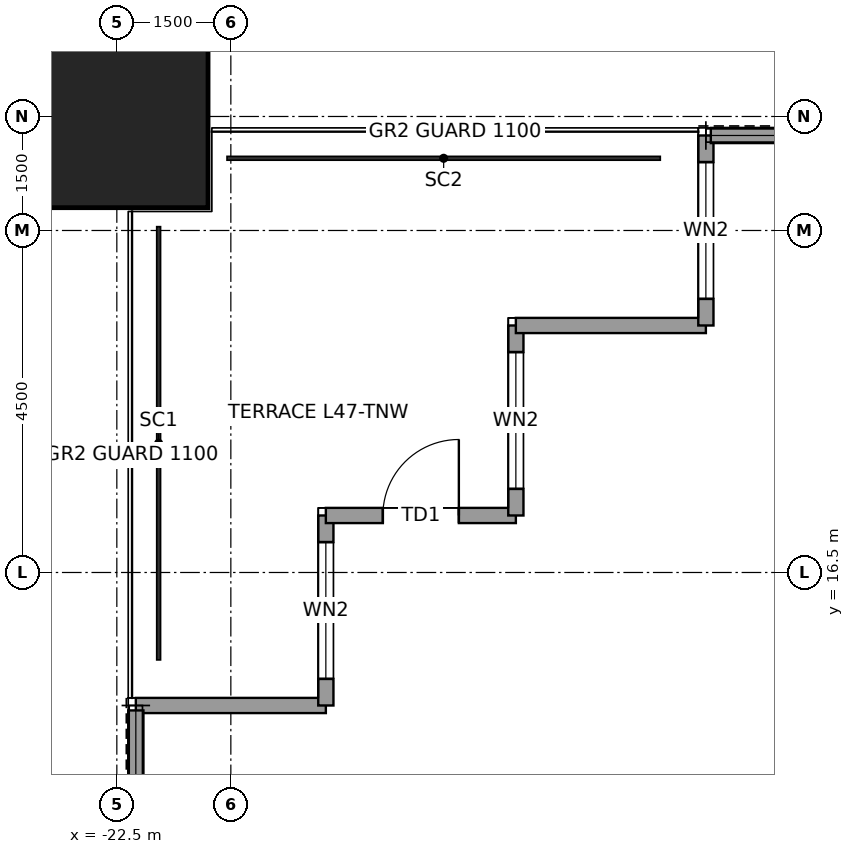
"""IFC4 building model, lengths in metres.
Left out: names, types, materials, properties, quantities, classifications, styles, units other than length and angle.
Written with IfcOpenShell. Run it as: python <this file> out.ifc"""

import sys

from ifc_helpers import new_model, si_unit, direction, frame, frame_2d, origin, origin_2d, place, context, subcontext, project, spatial, rectangle, hollow_rectangle, extrude, element, fill, save


model = new_model("IFC4")
c1 = context("Model", 3, precision=1e-05, world=origin(), true_north=direction((0.0, 1.0)))
c2 = subcontext(c1, "Body", "Model", "MODEL_VIEW")
j1 = project(units=[si_unit("LENGTHUNIT", "METRE"), si_unit("PLANEANGLEUNIT", "RADIAN")], contexts=[c1])
p1 = place(None, origin())
s1 = spatial("IfcSite", under=j1, at=p1, CompositionType="ELEMENT")
p2 = place(p1, origin())
s2 = spatial("IfcBuilding", under=s1, at=p2, CompositionType="ELEMENT")
p3 = place(p2, frame((0.0, 0.0, 221.9)))
s3 = spatial("IfcBuildingStorey", under=s2, at=p3, CompositionType="ELEMENT", Elevation=221.9)
p4 = place(p3, frame((-22.5, 22.5, 0.0), z_axis=(0.0, 0.0, 1.0), x_axis=(1.0, 0.0, 0.0)))
e1 = element("IfcColumn", 1, at=p4, inside=s3, PredefinedType="COLUMN", context=c2, shape_type="SweptSolid", body=[
    extrude(hollow_rectangle(XDim=2.4, YDim=2.4, WallThickness=0.12, at=origin_2d()), origin(), (0.0, 0.0, 1.0), 4.0),
])
p5 = place(p3, frame((-22.25, 14.75, 0.0), z_axis=(0.0, 0.0, 1.0), x_axis=(1.0, 0.0, 0.0)))
e2 = element("IfcWall", 2, at=p5, inside=s3, PredefinedType="SOLIDWALL", context=c2, shape_type="SweptSolid", body=[
    extrude(rectangle(XDim=2.5, YDim=0.2, at=frame_2d((1.25, 0.0))), origin(), (0.0, 0.0, 1.0), 3.85),
])
p6 = place(p3, frame((-19.75, 14.75, 0.0), z_axis=(0.0, 0.0, 1.0), x_axis=(0.0, 1.0, 0.0)))
e3 = element("IfcWall", 3, at=p6, inside=s3, PredefinedType="SOLIDWALL", context=c2, shape_type="SweptSolid", body=[
    extrude(rectangle(XDim=2.5, YDim=0.2, at=frame_2d((1.25, 0.0))), origin(), (0.0, 0.0, 1.0), 3.85),
])
p7 = place(p6, frame((0.35, 0.0, 0.3)))
e4 = element("IfcOpeningElement", 4, at=p7, cuts=e3, PredefinedType="OPENING", context=c2, shape_type="SweptSolid", body=[
    extrude(rectangle(XDim=1.8, YDim=2.4, at=frame_2d((0.9, 1.2))), frame((0.0, 0.11, 0.0), z_axis=(0.0, -1.0, 0.0), x_axis=(1.0, 0.0, 0.0)), (0.0, 0.0, 1.0), 0.22),
])
p8 = place(p3, frame((-19.75, 17.25, 0.0), z_axis=(0.0, 0.0, 1.0), x_axis=(1.0, 0.0, 0.0)))
e5 = element("IfcWall", 5, at=p8, inside=s3, PredefinedType="SOLIDWALL", context=c2, shape_type="SweptSolid", body=[
    extrude(rectangle(XDim=2.5, YDim=0.2, at=frame_2d((1.25, 0.0))), origin(), (0.0, 0.0, 1.0), 3.85),
])
p9 = place(p8, frame((0.75, 0.0, 0.0)))
e6 = element("IfcOpeningElement", 6, at=p9, cuts=e5, PredefinedType="OPENING", context=c2, shape_type="SweptSolid", body=[
    extrude(rectangle(XDim=1.0, YDim=2.4, at=frame_2d((0.5, 1.2))), frame((0.0, 0.11, 0.0), z_axis=(0.0, -1.0, 0.0), x_axis=(1.0, 0.0, 0.0)), (0.0, 0.0, 1.0), 0.22),
])
p10 = place(p3, frame((-17.25, 17.25, 0.0), z_axis=(0.0, 0.0, 1.0), x_axis=(0.0, 1.0, 0.0)))
e7 = element("IfcWall", 7, at=p10, inside=s3, PredefinedType="SOLIDWALL", context=c2, shape_type="SweptSolid", body=[
    extrude(rectangle(XDim=2.5, YDim=0.2, at=frame_2d((1.25, 0.0))), origin(), (0.0, 0.0, 1.0), 3.85),
])
p11 = place(p10, frame((0.35, 0.0, 0.3)))
e8 = element("IfcOpeningElement", 8, at=p11, cuts=e7, PredefinedType="OPENING", context=c2, shape_type="SweptSolid", body=[
    extrude(rectangle(XDim=1.8, YDim=2.4, at=frame_2d((0.9, 1.2))), frame((0.0, 0.11, 0.0), z_axis=(0.0, -1.0, 0.0), x_axis=(1.0, 0.0, 0.0)), (0.0, 0.0, 1.0), 0.22),
])
p12 = place(p3, frame((-17.25, 19.75, 0.0), z_axis=(0.0, 0.0, 1.0), x_axis=(1.0, 0.0, 0.0)))
e9 = element("IfcWall", 9, at=p12, inside=s3, PredefinedType="SOLIDWALL", context=c2, shape_type="SweptSolid", body=[
    extrude(rectangle(XDim=2.5, YDim=0.2, at=frame_2d((1.25, 0.0))), origin(), (0.0, 0.0, 1.0), 3.85),
])
p13 = place(p3, frame((-14.75, 19.75, 0.0), z_axis=(0.0, 0.0, 1.0), x_axis=(0.0, 1.0, 0.0)))
e10 = element("IfcWall", 10, at=p13, inside=s3, PredefinedType="SOLIDWALL", context=c2, shape_type="SweptSolid", body=[
    extrude(rectangle(XDim=2.5, YDim=0.2, at=frame_2d((1.25, 0.0))), origin(), (0.0, 0.0, 1.0), 3.85),
])
p14 = place(p13, frame((0.35, 0.0, 0.3)))
e11 = element("IfcOpeningElement", 11, at=p14, cuts=e10, PredefinedType="OPENING", context=c2, shape_type="SweptSolid", body=[
    extrude(rectangle(XDim=1.8, YDim=2.4, at=frame_2d((0.9, 1.2))), frame((0.0, 0.11, 0.0), z_axis=(0.0, -1.0, 0.0), x_axis=(1.0, 0.0, 0.0)), (0.0, 0.0, 1.0), 0.22),
])
for number, where, z_axis, x_axis in (
    (12, (-14.685, 22.25, 0.0), (0.0, 0.0, 1.0), (1.0, 0.0, 0.0)),
    (13, (-22.25, 12.366, 0.0), (0.0, 0.0, 1.0), (0.0, 1.0, 0.0)),
):
    element("IfcWall", number, at=place(p3, frame(where, z_axis=z_axis, x_axis=x_axis)), inside=s3, PredefinedType="SOLIDWALL", context=c2, shape_type="SweptSolid", body=[
        extrude(rectangle(XDim=2.319, YDim=0.2, at=frame_2d((1.16, 0.0))), origin(), (0.0, 0.0, 1.0), 3.85),
    ])
p15 = place(p7, origin())
e14 = element("IfcWindow", 14, at=p15, inside=s3, PartitioningType="SINGLE_PANEL", PredefinedType="WINDOW", context=c2, shape_type="SweptSolid", body=[
    extrude(rectangle(XDim=1.8, YDim=2.4, at=frame_2d((0.9, 1.2))), frame((0.0, 0.03, 0.0), z_axis=(0.0, -1.0, 0.0), x_axis=(1.0, 0.0, 0.0)), (0.0, 0.0, 1.0), 0.06),
])
fill(e4, e14)
p16 = place(p9, origin())
e15 = element("IfcDoor", 15, at=p16, inside=s3, OperationType="SINGLE_SWING_RIGHT", PredefinedType="DOOR", context=c2, shape_type="SweptSolid", body=[
    extrude(rectangle(XDim=1.0, YDim=2.4, at=frame_2d((0.5, 1.2))), frame((0.0, 0.025, 0.0), z_axis=(0.0, -1.0, 0.0), x_axis=(1.0, 0.0, 0.0)), (0.0, 0.0, 1.0), 0.05),
])
fill(e6, e15)
p17 = place(p11, origin())
e16 = element("IfcWindow", 16, at=p17, inside=s3, PartitioningType="SINGLE_PANEL", PredefinedType="WINDOW", context=c2, shape_type="SweptSolid", body=[
    extrude(rectangle(XDim=1.8, YDim=2.4, at=frame_2d((0.9, 1.2))), frame((0.0, 0.03, 0.0), z_axis=(0.0, -1.0, 0.0), x_axis=(1.0, 0.0, 0.0)), (0.0, 0.0, 1.0), 0.06),
])
fill(e8, e16)
p18 = place(p14, origin())
e17 = element("IfcWindow", 17, at=p18, inside=s3, PartitioningType="SINGLE_PANEL", PredefinedType="WINDOW", context=c2, shape_type="SweptSolid", body=[
    extrude(rectangle(XDim=1.8, YDim=2.4, at=frame_2d((0.9, 1.2))), frame((0.0, 0.03, 0.0), z_axis=(0.0, -1.0, 0.0), x_axis=(1.0, 0.0, 0.0)), (0.0, 0.0, 1.0), 0.06),
])
fill(e11, e17)
save(model, sys.argv[1])
